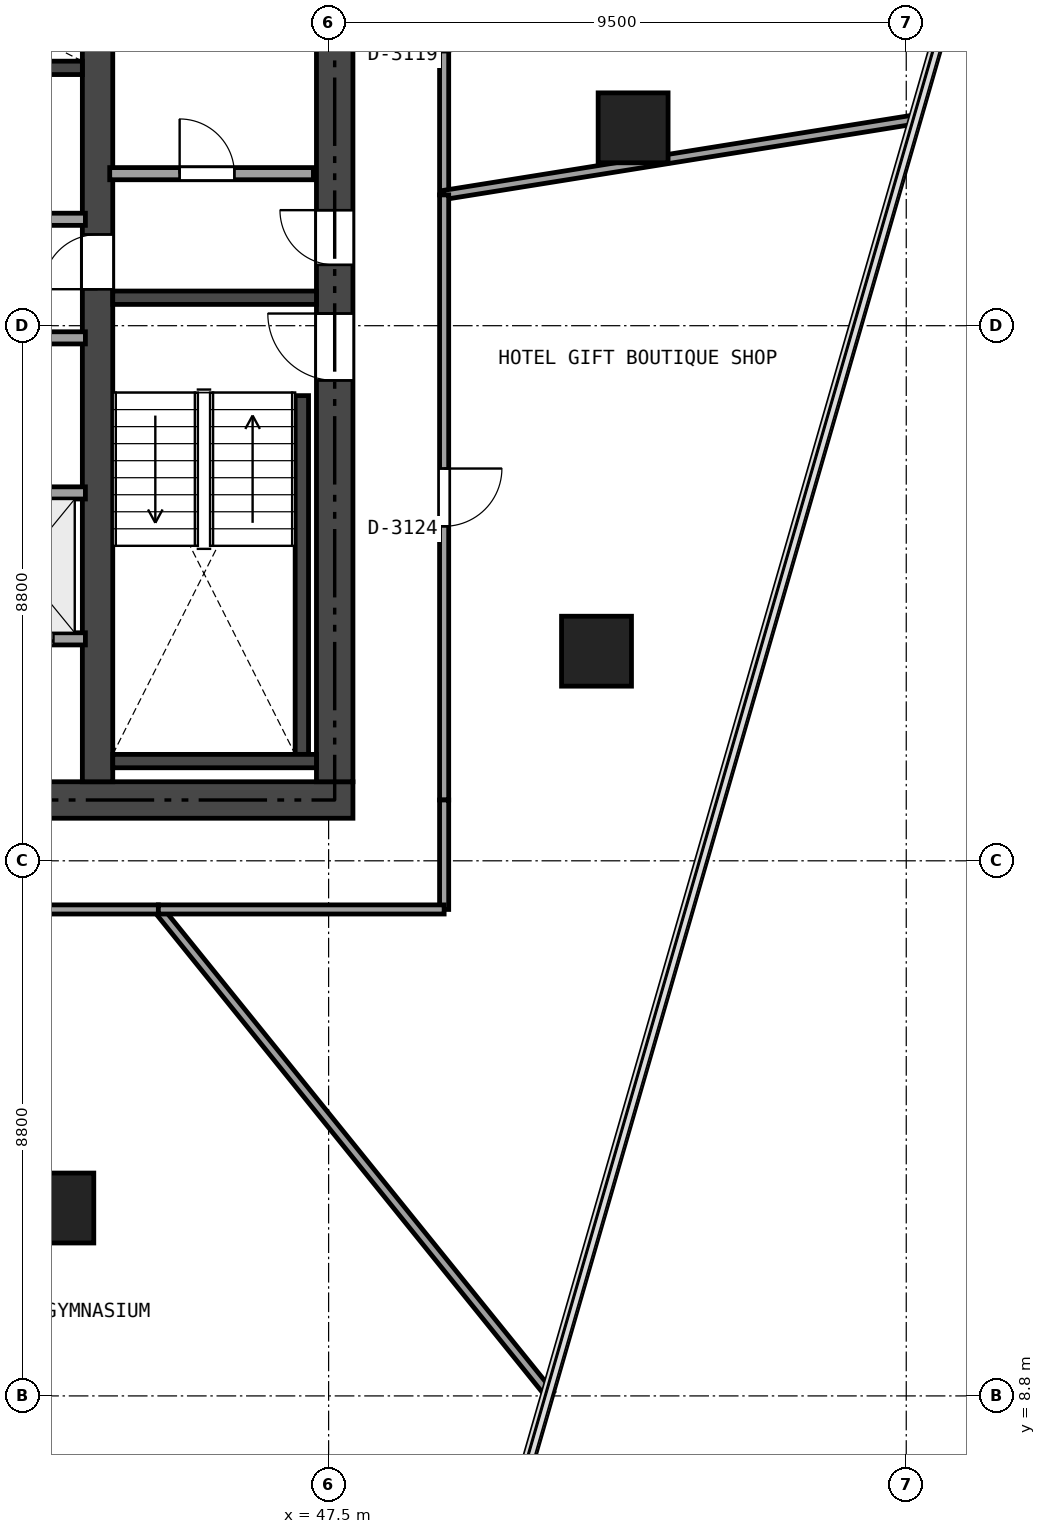
"""IFC4 building model, lengths in metres.
Left out: names, types, materials, properties, quantities, classifications, styles, units other than length and angle.
Written with IfcOpenShell. Run it as: python <this file> out.ifc"""

import sys

from ifc_helpers import new_model, si_unit, direction, frame, frame_2d, origin, origin_2d, place, context, subcontext, project, spatial, rectangle, extrude, element, fill, save


model = new_model("IFC4")
c1 = context("Model", 3, precision=1e-05, world=origin(), true_north=direction((0.0, 1.0)))
c2 = subcontext(c1, "Body", "Model", "MODEL_VIEW")
j1 = project(units=[si_unit("LENGTHUNIT", "METRE"), si_unit("PLANEANGLEUNIT", "RADIAN")], contexts=[c1])
p1 = place(None, origin())
s1 = spatial("IfcSite", under=j1, at=p1, CompositionType="ELEMENT")
p2 = place(p1, origin())
s2 = spatial("IfcBuilding", under=s1, at=p2, CompositionType="ELEMENT")
p3 = place(p2, frame((0.0, 0.0, 117.75)))
s3 = spatial("IfcBuildingStorey", under=s2, at=p3, CompositionType="ELEMENT", Elevation=117.75)
p4 = place(p3, frame((26.5, 18.6, 0.0), z_axis=(0.0, 0.0, 1.0), x_axis=(1.0, 0.0, 0.0)))
e1 = element("IfcWall", 1, at=p4, inside=s3, PredefinedType="SHEAR", context=c2, shape_type="SweptSolid", body=[
    extrude(rectangle(XDim=21.4, YDim=0.6, at=frame_2d((10.7, 0.0))), origin(), (0.0, 0.0, 1.0), 3.09),
])
p5 = place(p4, frame((12.425, 0.0, 0.0)))
e2 = element("IfcOpeningElement", 2, at=p5, cuts=e1, PredefinedType="OPENING", context=c2, shape_type="SweptSolid", body=[
    extrude(rectangle(XDim=1.15, YDim=2.15, at=frame_2d((0.575, 1.075))), frame((0.0, 0.31, 0.0), z_axis=(0.0, -1.0, 0.0), x_axis=(1.0, 0.0, 0.0)), (0.0, 0.0, 1.0), 0.62),
])
p6 = place(p4, frame((5.25, 0.0, 0.0)))
e3 = element("IfcOpeningElement", 3, at=p6, cuts=e1, PredefinedType="OPENING", context=c2, shape_type="SweptSolid", body=[
    extrude(rectangle(XDim=0.9, YDim=2.1, at=frame_2d((0.45, 1.05))), frame((0.0, 0.31, 0.0), z_axis=(0.0, -1.0, 0.0), x_axis=(1.0, 0.0, 0.0)), (0.0, 0.0, 1.0), 0.62),
])
p7 = place(p3, frame((47.6, 18.9, 0.0), z_axis=(0.0, 0.0, 1.0), x_axis=(0.0, 1.0, 0.0)))
e4 = element("IfcWall", 4, at=p7, inside=s3, PredefinedType="SHEAR", context=c2, shape_type="SweptSolid", body=[
    extrude(rectangle(XDim=15.0, YDim=0.6, at=frame_2d((7.5, 0.0))), origin(), (0.0, 0.0, 1.0), 3.09),
])
p8 = place(p7, frame((6.6, 0.0, 0.0)))
e5 = element("IfcOpeningElement", 5, at=p8, cuts=e4, PredefinedType="OPENING", context=c2, shape_type="SweptSolid", body=[
    extrude(rectangle(XDim=1.1, YDim=2.15, at=frame_2d((0.55, 1.075))), frame((0.0, 0.31, 0.0), z_axis=(0.0, -1.0, 0.0), x_axis=(1.0, 0.0, 0.0)), (0.0, 0.0, 1.0), 0.62),
])
p9 = place(p7, frame((8.5, 0.0, 0.0)))
e6 = element("IfcOpeningElement", 6, at=p9, cuts=e4, PredefinedType="OPENING", context=c2, shape_type="SweptSolid", body=[
    extrude(rectangle(XDim=0.9, YDim=2.1, at=frame_2d((0.45, 1.05))), frame((0.0, 0.31, 0.0), z_axis=(0.0, -1.0, 0.0), x_axis=(1.0, 0.0, 0.0)), (0.0, 0.0, 1.0), 0.62),
])
p10 = place(p7, frame((13.15, 0.0, 0.0)))
e7 = element("IfcOpeningElement", 7, at=p10, cuts=e4, PredefinedType="OPENING", context=c2, shape_type="SweptSolid", body=[
    extrude(rectangle(XDim=0.9, YDim=2.1, at=frame_2d((0.45, 1.05))), frame((0.0, 0.31, 0.0), z_axis=(0.0, -1.0, 0.0), x_axis=(1.0, 0.0, 0.0)), (0.0, 0.0, 1.0), 0.62),
])
p11 = place(p3, frame((43.7, 18.9, 0.0), z_axis=(0.0, 0.0, 1.0), x_axis=(0.0, 1.0, 0.0)))
e8 = element("IfcWall", 8, at=p11, inside=s3, PredefinedType="SHEAR", context=c2, shape_type="SweptSolid", body=[
    extrude(rectangle(XDim=15.0, YDim=0.5, at=frame_2d((7.5, 0.0))), origin(), (0.0, 0.0, 1.0), 3.09),
])
p12 = place(p11, frame((8.1, 0.0, 0.0)))
e9 = element("IfcOpeningElement", 9, at=p12, cuts=e8, PredefinedType="OPENING", context=c2, shape_type="SweptSolid", body=[
    extrude(rectangle(XDim=0.9, YDim=2.1, at=frame_2d((0.45, 1.05))), frame((0.0, 0.26, 0.0), z_axis=(0.0, -1.0, 0.0), x_axis=(1.0, 0.0, 0.0)), (0.0, 0.0, 1.0), 0.52),
])
p13 = place(p3, frame((43.95, 26.86, 0.0), z_axis=(0.0, 0.0, 1.0), x_axis=(1.0, 0.0, 0.0)))
e10 = element("IfcWall", 10, at=p13, inside=s3, PredefinedType="SHEAR", context=c2, shape_type="SweptSolid", body=[
    extrude(rectangle(XDim=3.35, YDim=0.22, at=frame_2d((1.675, 0.0))), origin(), (0.0, 0.0, 1.0), 3.09),
])
p14 = place(p3, frame((47.06, 19.35, 0.0), z_axis=(0.0, 0.0, 1.0), x_axis=(0.0, 1.0, 0.0)))
e11 = element("IfcWall", 11, at=p14, inside=s3, PredefinedType="SHEAR", context=c2, shape_type="SweptSolid", body=[
    extrude(rectangle(XDim=5.9, YDim=0.22, at=frame_2d((2.95, 0.0))), origin(), (0.0, 0.0, 1.0), 3.09),
])
p15 = place(p3, frame((43.95, 19.24, 0.0), z_axis=(0.0, 0.0, 1.0), x_axis=(1.0, 0.0, 0.0)))
e12 = element("IfcWall", 12, at=p15, inside=s3, PredefinedType="SHEAR", context=c2, shape_type="SweptSolid", body=[
    extrude(rectangle(XDim=3.35, YDim=0.22, at=frame_2d((1.675, 0.0))), origin(), (0.0, 0.0, 1.0), 3.09),
])
p16 = place(p3, frame((35.84, 30.64, 0.0), z_axis=(0.0, 0.0, 1.0), x_axis=(1.0, 0.0, 0.0)))
e13 = element("IfcWall", 13, at=p16, inside=s3, PredefinedType="SHEAR", context=c2, shape_type="SweptSolid", body=[
    extrude(rectangle(XDim=7.61, YDim=0.22, at=frame_2d((3.805, 0.0))), origin(), (0.0, 0.0, 1.0), 3.09),
])
for number, where, z_axis, x_axis in (
    (14, (52.508, 29.654, 0.0), (0.0, 0.0, 1.0), (1.0, 0.0, 0.0)),
    (15, (43.063, 11.89, 0.0), (0.0, 0.0, 1.0), (1.0, 0.0, 0.0)),
    (16, (51.906, 21.047, 0.0), (0.0, 0.0, 1.0), (1.0, 0.0, 0.0)),
):
    element("IfcColumn", number, at=place(p3, frame(where, z_axis=z_axis, x_axis=x_axis)), inside=s3, PredefinedType="COLUMN", context=c2, shape_type="SweptSolid", body=[
        extrude(rectangle(XDim=1.15, YDim=1.15, at=origin_2d()), origin(), (0.0, 0.0, 1.0), 3.09),
    ])
p17 = place(p3, frame((43.9, 28.9, 0.0), z_axis=(0.0, 0.0, 1.0), x_axis=(1.0, 0.0, 0.0)))
e17 = element("IfcWall", 17, at=p17, inside=s3, PredefinedType="SOLIDWALL", context=c2, shape_type="SweptSolid", body=[
    extrude(rectangle(XDim=3.35, YDim=0.2, at=frame_2d((1.675, 0.0))), origin(), (0.0, 0.0, 1.0), 3.09),
])
p18 = place(p17, frame((1.15, 0.0, 0.0)))
e18 = element("IfcOpeningElement", 18, at=p18, cuts=e17, PredefinedType="OPENING", context=c2, shape_type="SweptSolid", body=[
    extrude(rectangle(XDim=0.9, YDim=2.1, at=frame_2d((0.45, 1.05))), frame((0.0, 0.11, 0.0), z_axis=(0.0, -1.0, 0.0), x_axis=(1.0, 0.0, 0.0)), (0.0, 0.0, 1.0), 0.22),
])
for number, where, z_axis, x_axis in (
    (19, (35.62, 28.15, 0.0), (0.0, 0.0, 1.0), (1.0, 0.0, 0.0)),
    (20, (35.62, 26.2, 0.0), (0.0, 0.0, 1.0), (1.0, 0.0, 0.0)),
):
    element("IfcWall", number, at=place(p3, frame(where, z_axis=z_axis, x_axis=x_axis)), inside=s3, PredefinedType="SOLIDWALL", context=c2, shape_type="SweptSolid", body=[
        extrude(rectangle(XDim=7.88, YDim=0.2, at=frame_2d((3.94, 0.0))), origin(), (0.0, 0.0, 1.0), 3.09),
    ])
p19 = place(p3, frame((35.62, 23.65, 0.0), z_axis=(0.0, 0.0, 1.0), x_axis=(1.0, 0.0, 0.0)))
e21 = element("IfcWall", 21, at=p19, inside=s3, PredefinedType="SOLIDWALL", context=c2, shape_type="SweptSolid", body=[
    extrude(rectangle(XDim=7.88, YDim=0.2, at=frame_2d((3.94, 0.0))), origin(), (0.0, 0.0, 1.0), 2.611),
])
p20 = place(p3, frame((35.62, 21.25, 0.0), z_axis=(0.0, 0.0, 1.0), x_axis=(1.0, 0.0, 0.0)))
e22 = element("IfcWall", 22, at=p20, inside=s3, PredefinedType="SOLIDWALL", context=c2, shape_type="SweptSolid", body=[
    extrude(rectangle(XDim=7.88, YDim=0.2, at=frame_2d((3.94, 0.0))), origin(), (0.0, 0.0, 1.0), 3.09),
])
p21 = place(p20, frame((0.405, 0.0, 0.0)))
e23 = element("IfcOpeningElement", 23, at=p21, cuts=e22, PredefinedType="OPENING", context=c2, shape_type="SweptSolid", body=[
    extrude(rectangle(XDim=1.1, YDim=2.15, at=frame_2d((0.55, 1.075))), frame((0.0, 0.11, 0.0), z_axis=(0.0, -1.0, 0.0), x_axis=(1.0, 0.0, 0.0)), (0.0, 0.0, 1.0), 0.22),
])
p22 = place(p20, frame((2.355, 0.0, 0.0)))
e24 = element("IfcOpeningElement", 24, at=p22, cuts=e22, PredefinedType="OPENING", context=c2, shape_type="SweptSolid", body=[
    extrude(rectangle(XDim=1.1, YDim=2.15, at=frame_2d((0.55, 1.075))), frame((0.0, 0.11, 0.0), z_axis=(0.0, -1.0, 0.0), x_axis=(1.0, 0.0, 0.0)), (0.0, 0.0, 1.0), 0.22),
])
p23 = place(p20, frame((4.305, 0.0, 0.0)))
e25 = element("IfcOpeningElement", 25, at=p23, cuts=e22, PredefinedType="OPENING", context=c2, shape_type="SweptSolid", body=[
    extrude(rectangle(XDim=1.1, YDim=2.15, at=frame_2d((0.55, 1.075))), frame((0.0, 0.11, 0.0), z_axis=(0.0, -1.0, 0.0), x_axis=(1.0, 0.0, 0.0)), (0.0, 0.0, 1.0), 0.22),
])
p24 = place(p20, frame((6.255, 0.0, 0.0)))
e26 = element("IfcOpeningElement", 26, at=p24, cuts=e22, PredefinedType="OPENING", context=c2, shape_type="SweptSolid", body=[
    extrude(rectangle(XDim=1.1, YDim=2.15, at=frame_2d((0.55, 1.075))), frame((0.0, 0.11, 0.0), z_axis=(0.0, -1.0, 0.0), x_axis=(1.0, 0.0, 0.0)), (0.0, 0.0, 1.0), 0.22),
])
p25 = place(p3, frame((49.4, 34.2, 0.0), z_axis=(0.0, 0.0, 1.0), x_axis=(0.0, -1.0, 0.0)))
e27 = element("IfcWall", 27, at=p25, inside=s3, PredefinedType="PARTITIONING", context=c2, shape_type="SweptSolid", body=[
    extrude(rectangle(XDim=5.649, YDim=0.15, at=frame_2d((2.824, 0.0))), origin(), (0.0, 0.0, 1.0), 2.375),
])
p26 = place(p25, frame((2.35, 0.0, 0.0)))
e28 = element("IfcOpeningElement", 28, at=p26, cuts=e27, PredefinedType="OPENING", context=c2, shape_type="SweptSolid", body=[
    extrude(rectangle(XDim=0.95, YDim=2.15, at=frame_2d((0.475, 1.075))), frame((0.0, 0.085, 0.0), z_axis=(0.0, -1.0, 0.0), x_axis=(1.0, 0.0, 0.0)), (0.0, 0.0, 1.0), 0.17),
])
p27 = place(p3, frame((49.4, 28.551, 0.0), z_axis=(0.0, 0.0, 1.0), x_axis=(0.987395734104, 0.158270857307, 0.0)))
e29 = element("IfcWall", 29, at=p27, inside=s3, PredefinedType="PARTITIONING", context=c2, shape_type="SweptSolid", body=[
    extrude(rectangle(XDim=7.879, YDim=0.15, at=frame_2d((3.94, 0.0))), origin(), (0.0, 0.0, 1.0), 2.375),
])
p28 = place(p3, frame((51.141, 8.822, 0.0), z_axis=(0.0, 0.0, 1.0), x_axis=(-0.628181913261, 0.778066503489, 0.0)))
e30 = element("IfcWall", 30, at=p28, inside=s3, PredefinedType="PARTITIONING", context=c2, shape_type="SweptSolid", body=[
    extrude(rectangle(XDim=10.254, YDim=0.15, at=frame_2d((5.127, 0.0))), origin(), (0.0, 0.0, 1.0), 2.375),
])
p29 = place(p3, frame((44.7, 16.8, 0.0), z_axis=(0.0, 0.0, 1.0), x_axis=(-1.0, 0.0, 0.0)))
e31 = element("IfcWall", 31, at=p29, inside=s3, PredefinedType="PARTITIONING", context=c2, shape_type="SweptSolid", body=[
    extrude(rectangle(XDim=11.379, YDim=0.15, at=frame_2d((5.689, 0.0))), origin(), (0.0, 0.0, 1.0), 2.387),
])
p30 = place(p29, frame((4.79, 0.0, 0.0)))
e32 = element("IfcOpeningElement", 32, at=p30, cuts=e31, PredefinedType="OPENING", context=c2, shape_type="SweptSolid", body=[
    extrude(rectangle(XDim=1.8, YDim=2.25, at=frame_2d((0.9, 1.125))), frame((0.0, 0.085, 0.0), z_axis=(0.0, -1.0, 0.0), x_axis=(1.0, 0.0, 0.0)), (0.0, 0.0, 1.0), 0.17),
])
p31 = place(p3, frame((49.4, 28.551, 0.0), z_axis=(0.0, 0.0, 1.0), x_axis=(0.0, -1.0, 0.0)))
e33 = element("IfcWall", 33, at=p31, inside=s3, PredefinedType="PARTITIONING", context=c2, shape_type="SweptSolid", body=[
    extrude(rectangle(XDim=9.951, YDim=0.15, at=frame_2d((4.976, 0.0))), origin(), (0.0, 0.0, 1.0), 2.375),
])
p32 = place(p31, frame((4.5, 0.0, 0.0)))
e34 = element("IfcOpeningElement", 34, at=p32, cuts=e33, PredefinedType="OPENING", context=c2, shape_type="SweptSolid", body=[
    extrude(rectangle(XDim=0.95, YDim=2.15, at=frame_2d((0.475, 1.075))), frame((0.0, 0.085, 0.0), z_axis=(0.0, -1.0, 0.0), x_axis=(1.0, 0.0, 0.0)), (0.0, 0.0, 1.0), 0.17),
])
p33 = place(p3, frame((49.4, 18.6, 0.0), z_axis=(0.0, 0.0, 1.0), x_axis=(0.0, -1.0, 0.0)))
e35 = element("IfcWall", 35, at=p33, inside=s3, PredefinedType="PARTITIONING", context=c2, shape_type="SweptSolid", body=[
    extrude(rectangle(XDim=1.8, YDim=0.15, at=frame_2d((0.9, 0.0))), origin(), (0.0, 0.0, 1.0), 2.375),
])
p34 = place(p3, frame((49.4, 16.8, 0.0), z_axis=(0.0, 0.0, 1.0), x_axis=(-1.0, 0.0, 0.0)))
e36 = element("IfcWall", 36, at=p34, inside=s3, PredefinedType="PARTITIONING", context=c2, shape_type="SweptSolid", body=[
    extrude(rectangle(XDim=4.7, YDim=0.15, at=frame_2d((2.35, 0.0))), origin(), (0.0, 0.0, 1.0), 2.375),
])
p35 = place(p8, origin())
e37 = element("IfcDoor", 37, at=p35, inside=s3, OperationType="SINGLE_SWING_RIGHT", PredefinedType="DOOR", context=c2, shape_type="SweptSolid", body=[
    extrude(rectangle(XDim=1.1, YDim=2.15, at=frame_2d((0.55, 1.075))), frame((0.0, 0.025, 0.0), z_axis=(0.0, -1.0, 0.0), x_axis=(1.0, 0.0, 0.0)), (0.0, 0.0, 1.0), 0.05),
])
fill(e5, e37)
p36 = place(p12, origin())
e38 = element("IfcDoor", 38, at=p36, inside=s3, OperationType="SINGLE_SWING_LEFT", PredefinedType="DOOR", context=c2, shape_type="SweptSolid", body=[
    extrude(rectangle(XDim=0.9, YDim=2.1, at=frame_2d((0.45, 1.05))), frame((0.0, 0.025, 0.0), z_axis=(0.0, -1.0, 0.0), x_axis=(1.0, 0.0, 0.0)), (0.0, 0.0, 1.0), 0.05),
])
fill(e9, e38)
p37 = place(p9, origin())
e39 = element("IfcDoor", 39, at=p37, inside=s3, OperationType="SINGLE_SWING_RIGHT", PredefinedType="DOOR", context=c2, shape_type="SweptSolid", body=[
    extrude(rectangle(XDim=0.9, YDim=2.1, at=frame_2d((0.45, 1.05))), frame((0.0, 0.025, 0.0), z_axis=(0.0, -1.0, 0.0), x_axis=(1.0, 0.0, 0.0)), (0.0, 0.0, 1.0), 0.05),
])
fill(e6, e39)
p38 = place(p18, origin())
e40 = element("IfcDoor", 40, at=p38, inside=s3, OperationType="SINGLE_SWING_LEFT", PredefinedType="DOOR", context=c2, shape_type="SweptSolid", body=[
    extrude(rectangle(XDim=0.9, YDim=2.1, at=frame_2d((0.45, 1.05))), frame((0.0, 0.025, 0.0), z_axis=(0.0, -1.0, 0.0), x_axis=(1.0, 0.0, 0.0)), (0.0, 0.0, 1.0), 0.05),
])
fill(e18, e40)
p39 = place(p24, origin())
e41 = element("IfcDoor", 41, at=p39, inside=s3, OperationType="SLIDING_TO_LEFT", PredefinedType="DOOR", context=c2, shape_type="SweptSolid", body=[
    extrude(rectangle(XDim=1.1, YDim=2.15, at=frame_2d((0.55, 1.075))), frame((0.0, 0.025, 0.0), z_axis=(0.0, -1.0, 0.0), x_axis=(1.0, 0.0, 0.0)), (0.0, 0.0, 1.0), 0.05),
])
fill(e26, e41)
p40 = place(p32, origin())
e42 = element("IfcDoor", 42, at=p40, inside=s3, OperationType="SINGLE_SWING_LEFT", PredefinedType="DOOR", context=c2, shape_type="SweptSolid", body=[
    extrude(rectangle(XDim=0.95, YDim=2.15, at=frame_2d((0.475, 1.075))), frame((0.0, 0.025, 0.0), z_axis=(0.0, -1.0, 0.0), x_axis=(1.0, 0.0, 0.0)), (0.0, 0.0, 1.0), 0.05),
])
fill(e34, e42)
save(model, sys.argv[1])
